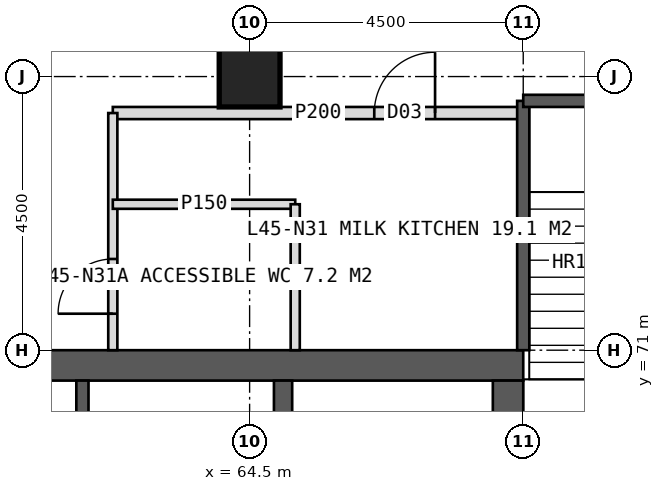
"""IFC4 building model, lengths in metres.
Left out: names, types, materials, properties, quantities, classifications, styles, units other than length and angle.
Written with IfcOpenShell. Run it as: python <this file> out.ifc"""

import sys

from ifc_helpers import new_model, si_unit, direction, frame, frame_2d, origin, origin_2d, place, context, subcontext, project, spatial, rectangle, hollow_rectangle, extrude, element, fill, save


model = new_model("IFC4")
c1 = context("Model", 3, precision=1e-05, world=origin(), true_north=direction((0.0, 1.0)))
c2 = subcontext(c1, "Body", "Model", "MODEL_VIEW")
j1 = project(units=[si_unit("LENGTHUNIT", "METRE"), si_unit("PLANEANGLEUNIT", "RADIAN")], contexts=[c1])
p1 = place(None, origin())
s1 = spatial("IfcSite", under=j1, at=p1, CompositionType="ELEMENT")
p2 = place(p1, origin())
s2 = spatial("IfcBuilding", under=s1, at=p2, CompositionType="ELEMENT")
p3 = place(p2, frame((0.0, 0.0, 189.0)))
s3 = spatial("IfcBuildingStorey", under=s2, at=p3, CompositionType="ELEMENT", Elevation=189.0)
p4 = place(p3, frame((51.0, 70.75, 0.0), z_axis=(0.0, 0.0, 1.0), x_axis=(1.0, 0.0, 0.0)))
e1 = element("IfcWall", 1, at=p4, inside=s3, PredefinedType="SHEAR", context=c2, shape_type="SweptSolid", body=[
    extrude(rectangle(XDim=18.0, YDim=0.5, at=frame_2d((9.0, 0.0))), origin(), (0.0, 0.0, 1.0), 4.0),
])
p5 = place(p4, frame((8.1, 0.0, 0.0)))
e2 = element("IfcOpeningElement", 2, at=p5, cuts=e1, PredefinedType="OPENING", context=c2, shape_type="SweptSolid", body=[
    extrude(rectangle(XDim=1.8, YDim=2.2, at=frame_2d((0.9, 1.1))), frame((0.0, 0.26, 0.0), z_axis=(0.0, -1.0, 0.0), x_axis=(1.0, 0.0, 0.0)), (0.0, 0.0, 1.0), 0.52),
])
p6 = place(p3, frame((68.75, 53.5, 0.0), z_axis=(0.0, 0.0, 1.0), x_axis=(0.0, 1.0, 0.0)))
e3 = element("IfcWall", 3, at=p6, inside=s3, PredefinedType="SHEAR", context=c2, shape_type="SweptSolid", body=[
    extrude(rectangle(XDim=17.0, YDim=0.5, at=frame_2d((8.5, 0.0))), origin(), (0.0, 0.0, 1.0), 4.0),
])
p7 = place(p6, frame((9.6, 0.0, 0.0)))
e4 = element("IfcOpeningElement", 4, at=p7, cuts=e3, PredefinedType="OPENING", context=c2, shape_type="SweptSolid", body=[
    extrude(rectangle(XDim=1.5, YDim=2.2, at=frame_2d((0.75, 1.1))), frame((0.0, 0.26, 0.0), z_axis=(0.0, -1.0, 0.0), x_axis=(1.0, 0.0, 0.0)), (0.0, 0.0, 1.0), 0.52),
])
p8 = place(p3, frame((65.05, 53.5, 0.0), z_axis=(0.0, 0.0, 1.0), x_axis=(0.0, 1.0, 0.0)))
e5 = element("IfcWall", 5, at=p8, inside=s3, PredefinedType="SHEAR", context=c2, shape_type="SweptSolid", body=[
    extrude(rectangle(XDim=17.0, YDim=0.3, at=frame_2d((8.5, 0.0))), origin(), (0.0, 0.0, 1.0), 4.0),
])
p9 = place(p3, frame((61.75, 53.5, 0.0), z_axis=(0.0, 0.0, 1.0), x_axis=(0.0, 1.0, 0.0)))
e6 = element("IfcWall", 6, at=p9, inside=s3, PredefinedType="SHEAR", context=c2, shape_type="SweptSolid", body=[
    extrude(rectangle(XDim=17.0, YDim=0.2, at=frame_2d((8.5, 0.0))), origin(), (0.0, 0.0, 1.0), 4.0),
])
p10 = place(p9, frame((0.496, 0.0, 0.0)))
e7 = element("IfcOpeningElement", 7, at=p10, cuts=e6, PredefinedType="OPENING", context=c2, shape_type="SweptSolid", body=[
    extrude(rectangle(XDim=1.0, YDim=2.1, at=frame_2d((0.5, 1.05))), frame((0.0, 0.11, 0.0), z_axis=(0.0, -1.0, 0.0), x_axis=(1.0, 0.0, 0.0)), (0.0, 0.0, 1.0), 0.22),
])
p11 = place(p9, frame((2.646, 0.0, 0.0)))
e8 = element("IfcOpeningElement", 8, at=p11, cuts=e6, PredefinedType="OPENING", context=c2, shape_type="SweptSolid", body=[
    extrude(rectangle(XDim=1.0, YDim=2.1, at=frame_2d((0.5, 1.05))), frame((0.0, 0.11, 0.0), z_axis=(0.0, -1.0, 0.0), x_axis=(1.0, 0.0, 0.0)), (0.0, 0.0, 1.0), 0.22),
])
p12 = place(p9, frame((5.027, 0.0, 0.0)))
e9 = element("IfcOpeningElement", 9, at=p12, cuts=e6, PredefinedType="OPENING", context=c2, shape_type="SweptSolid", body=[
    extrude(rectangle(XDim=1.0, YDim=2.1, at=frame_2d((0.5, 1.05))), frame((0.0, 0.11, 0.0), z_axis=(0.0, -1.0, 0.0), x_axis=(1.0, 0.0, 0.0)), (0.0, 0.0, 1.0), 0.22),
])
p13 = place(p9, frame((7.126, 0.0, 0.0)))
e10 = element("IfcOpeningElement", 10, at=p13, cuts=e6, PredefinedType="OPENING", context=c2, shape_type="SweptSolid", body=[
    extrude(rectangle(XDim=1.0, YDim=2.1, at=frame_2d((0.5, 1.05))), frame((0.0, 0.11, 0.0), z_axis=(0.0, -1.0, 0.0), x_axis=(1.0, 0.0, 0.0)), (0.0, 0.0, 1.0), 0.22),
])
p14 = place(p9, frame((10.025, 0.0, 0.0)))
e11 = element("IfcOpeningElement", 11, at=p14, cuts=e6, PredefinedType="OPENING", context=c2, shape_type="SweptSolid", body=[
    extrude(rectangle(XDim=1.4, YDim=2.2, at=frame_2d((0.7, 1.1))), frame((0.0, 0.11, 0.0), z_axis=(0.0, -1.0, 0.0), x_axis=(1.0, 0.0, 0.0)), (0.0, 0.0, 1.0), 0.22),
])
p15 = place(p9, frame((14.325, 0.0, 0.0)))
e12 = element("IfcOpeningElement", 12, at=p15, cuts=e6, PredefinedType="OPENING", context=c2, shape_type="SweptSolid", body=[
    extrude(rectangle(XDim=1.4, YDim=2.2, at=frame_2d((0.7, 1.1))), frame((0.0, 0.11, 0.0), z_axis=(0.0, -1.0, 0.0), x_axis=(1.0, 0.0, 0.0)), (0.0, 0.0, 1.0), 0.22),
])
p16 = place(p3, frame((64.5, 75.5, 0.0), z_axis=(0.0, 0.0, 1.0), x_axis=(1.0, 0.0, 0.0)))
e13 = element("IfcColumn", 13, at=p16, inside=s3, PredefinedType="COLUMN", context=c2, shape_type="SweptSolid", body=[
    extrude(hollow_rectangle(XDim=1.0, YDim=1.0, WallThickness=0.1, at=origin_2d()), origin(), (0.0, 0.0, 1.0), 4.0),
])
p17 = place(p3, frame((62.25, 74.9, 0.0), z_axis=(0.0, 0.0, 1.0), x_axis=(1.0, 0.0, 0.0)))
e14 = element("IfcWall", 14, at=p17, inside=s3, PredefinedType="PARTITIONING", context=c2, shape_type="SweptSolid", body=[
    extrude(rectangle(XDim=6.75, YDim=0.2, at=frame_2d((3.375, 0.0))), origin(), (0.0, 0.0, 1.0), 3.75),
])
p18 = place(p17, frame((4.3, 0.0, 0.0)))
e15 = element("IfcOpeningElement", 15, at=p18, cuts=e14, PredefinedType="OPENING", context=c2, shape_type="SweptSolid", body=[
    extrude(rectangle(XDim=1.0, YDim=2.1, at=frame_2d((0.5, 1.05))), frame((0.0, 0.11, 0.0), z_axis=(0.0, -1.0, 0.0), x_axis=(1.0, 0.0, 0.0)), (0.0, 0.0, 1.0), 0.22),
])
p19 = place(p3, frame((62.25, 71.0, 0.0), z_axis=(0.0, 0.0, 1.0), x_axis=(0.0, 1.0, 0.0)))
e16 = element("IfcWall", 16, at=p19, inside=s3, PredefinedType="PARTITIONING", context=c2, shape_type="SweptSolid", body=[
    extrude(rectangle(XDim=3.9, YDim=0.15, at=frame_2d((1.95, 0.0))), origin(), (0.0, 0.0, 1.0), 3.75),
])
p20 = place(p19, frame((0.6, 0.0, 0.0)))
e17 = element("IfcOpeningElement", 17, at=p20, cuts=e16, PredefinedType="OPENING", context=c2, shape_type="SweptSolid", body=[
    extrude(rectangle(XDim=0.9, YDim=2.1, at=frame_2d((0.45, 1.05))), frame((0.0, 0.085, 0.0), z_axis=(0.0, -1.0, 0.0), x_axis=(1.0, 0.0, 0.0)), (0.0, 0.0, 1.0), 0.17),
])
p21 = place(p3, frame((62.25, 73.4, 0.0), z_axis=(0.0, 0.0, 1.0), x_axis=(1.0, 0.0, 0.0)))
e18 = element("IfcWall", 18, at=p21, inside=s3, PredefinedType="PARTITIONING", context=c2, shape_type="SweptSolid", body=[
    extrude(rectangle(XDim=3.0, YDim=0.15, at=frame_2d((1.5, 0.0))), origin(), (0.0, 0.0, 1.0), 3.75),
])
p22 = place(p3, frame((65.25, 71.0, 0.0), z_axis=(0.0, 0.0, 1.0), x_axis=(0.0, 1.0, 0.0)))
e19 = element("IfcWall", 19, at=p22, inside=s3, PredefinedType="PARTITIONING", context=c2, shape_type="SweptSolid", body=[
    extrude(rectangle(XDim=2.4, YDim=0.15, at=frame_2d((1.2, 0.0))), origin(), (0.0, 0.0, 1.0), 3.75),
])
p23 = place(p3, frame((69.0, 71.0, 0.0), z_axis=(0.0, 0.0, 1.0), x_axis=(0.0, 1.0, 0.0)))
e20 = element("IfcWall", 20, at=p23, inside=s3, PredefinedType="SOLIDWALL", context=c2, shape_type="SweptSolid", body=[
    extrude(rectangle(XDim=4.1, YDim=0.2, at=frame_2d((2.05, 0.0))), origin(), (0.0, 0.0, 1.0), 3.75),
])
p24 = place(p3, frame((69.0, 75.1, 0.0), z_axis=(0.0, 0.0, 1.0), x_axis=(1.0, 0.0, 0.0)))
e21 = element("IfcWall", 21, at=p24, inside=s3, PredefinedType="SOLIDWALL", context=c2, shape_type="SweptSolid", body=[
    extrude(rectangle(XDim=3.5, YDim=0.2, at=frame_2d((1.75, 0.0))), origin(), (0.0, 0.0, 1.0), 3.75),
])
p25 = place(p24, frame((1.15, 0.0, 0.0)))
e22 = element("IfcOpeningElement", 22, at=p25, cuts=e21, PredefinedType="OPENING", context=c2, shape_type="SweptSolid", body=[
    extrude(rectangle(XDim=1.2, YDim=2.1, at=frame_2d((0.6, 1.05))), frame((0.0, 0.11, 0.0), z_axis=(0.0, -1.0, 0.0), x_axis=(1.0, 0.0, 0.0)), (0.0, 0.0, 1.0), 0.22),
])
p26 = place(p20, origin())
e23 = element("IfcDoor", 23, at=p26, inside=s3, OperationType="SINGLE_SWING_LEFT", PredefinedType="DOOR", context=c2, shape_type="SweptSolid", body=[
    extrude(rectangle(XDim=0.9, YDim=2.1, at=frame_2d((0.45, 1.05))), frame((0.0, 0.025, 0.0), z_axis=(0.0, -1.0, 0.0), x_axis=(1.0, 0.0, 0.0)), (0.0, 0.0, 1.0), 0.05),
])
fill(e17, e23)
p27 = place(p18, origin())
e24 = element("IfcDoor", 24, at=p27, inside=s3, OperationType="SINGLE_SWING_RIGHT", PredefinedType="DOOR", context=c2, shape_type="SweptSolid", body=[
    extrude(rectangle(XDim=1.0, YDim=2.1, at=frame_2d((0.5, 1.05))), frame((0.0, 0.025, 0.0), z_axis=(0.0, -1.0, 0.0), x_axis=(1.0, 0.0, 0.0)), (0.0, 0.0, 1.0), 0.05),
])
fill(e15, e24)
save(model, sys.argv[1])
